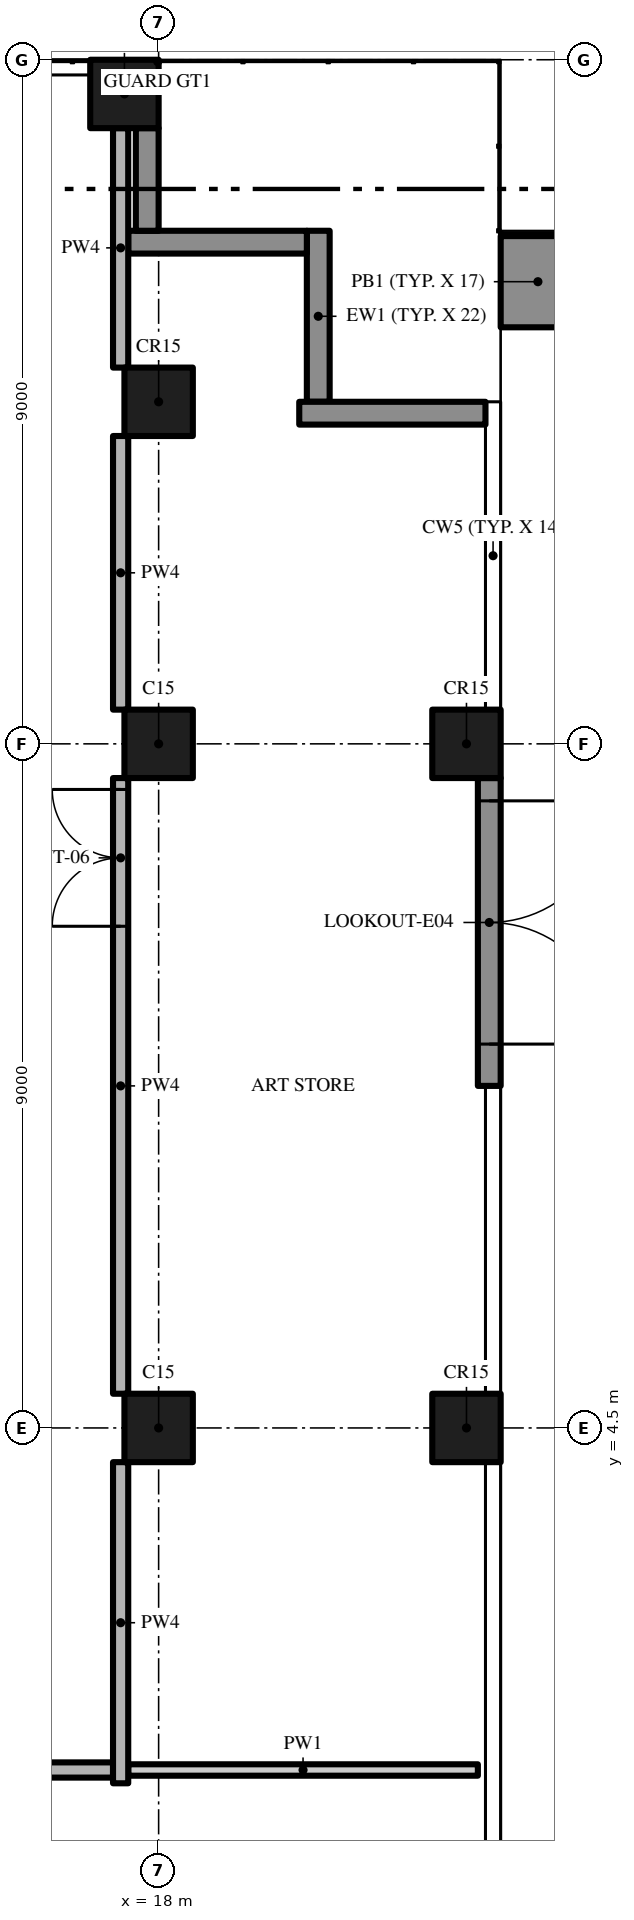
"""IFC4 building model, lengths in metres.
Left out: names, types, materials, properties, quantities, classifications, styles, units other than length and angle.
Written with IfcOpenShell. Run it as: python <this file> out.ifc"""

import sys

from ifc_helpers import new_model, si_unit, direction, frame, frame_2d, origin, origin_2d, place, context, subcontext, project, spatial, rectangle, extrude, element, fill, save


model = new_model("IFC4")
c1 = context("Model", 3, precision=1e-05, world=origin(), true_north=direction((0.0, 1.0)))
c2 = subcontext(c1, "Body", "Model", "MODEL_VIEW")
j1 = project(units=[si_unit("LENGTHUNIT", "METRE"), si_unit("PLANEANGLEUNIT", "RADIAN")], contexts=[c1])
p1 = place(None, origin())
s1 = spatial("IfcSite", under=j1, at=p1, CompositionType="ELEMENT")
p2 = place(p1, origin())
s2 = spatial("IfcBuilding", under=s1, at=p2, CompositionType="ELEMENT")
p3 = place(p2, frame((0.0, 0.0, 297.4)))
s3 = spatial("IfcBuildingStorey", under=s2, at=p3, CompositionType="ELEMENT", Elevation=297.4)
for number, where, z_axis, x_axis in (
    (1, (18.0, 13.5, 0.0), (0.0, 0.0, 1.0), (1.0, 0.0, 0.0)),
    (2, (17.55, 22.05, 0.0), (0.0, 0.0, 1.0), (1.0, 0.0, 0.0)),
    (3, (18.0, 4.5, 0.0), (0.0, 0.0, 1.0), (1.0, 0.0, 0.0)),
    (4, (22.05, 13.5, 0.0), (0.0, 0.0, 1.0), (1.0, 0.0, 0.0)),
    (5, (18.0, 18.0, 0.0), (0.0, 0.0, 1.0), (1.0, 0.0, 0.0)),
    (6, (22.05, 4.5, 0.0), (0.0, 0.0, 1.0), (1.0, 0.0, 0.0)),
):
    element("IfcColumn", number, at=place(p3, frame(where, z_axis=z_axis, x_axis=x_axis)), inside=s3, PredefinedType="COLUMN", context=c2, shape_type="SweptSolid", body=[
        extrude(rectangle(XDim=0.9, YDim=0.9, at=origin_2d()), origin(), (0.0, 0.0, 1.0), 5.65),
    ])
p4 = place(p3, frame((22.35, 13.05, 0.0), z_axis=(0.0, 0.0, 1.0), x_axis=(0.0, -1.0, 0.0)))
e7 = element("IfcWall", 7, at=p4, inside=s3, PredefinedType="SOLIDWALL", context=c2, shape_type="SweptSolid", body=[
    extrude(rectangle(XDim=4.05, YDim=0.3, at=frame_2d((2.025, 0.0))), origin(), (0.0, 0.0, 1.0), 5.65),
])
p5 = place(p4, frame((0.3, 0.0, 0.0)))
e8 = element("IfcOpeningElement", 8, at=p5, cuts=e7, PredefinedType="OPENING", context=c2, shape_type="SweptSolid", body=[
    extrude(rectangle(XDim=3.2, YDim=2.4, at=frame_2d((1.6, 1.2))), frame((0.0, 0.16, 0.0), z_axis=(0.0, -1.0, 0.0), x_axis=(1.0, 0.0, 0.0)), (0.0, 0.0, 1.0), 0.32),
])
p6 = place(p3, frame((19.85, 17.85, 0.0), z_axis=(0.0, 0.0, 1.0), x_axis=(1.0, 0.0, 0.0)))
e9 = element("IfcWall", 9, at=p6, inside=s3, PredefinedType="SOLIDWALL", context=c2, shape_type="SweptSolid", body=[
    extrude(rectangle(XDim=2.45, YDim=0.3, at=frame_2d((1.225, 0.0))), origin(), (0.0, 0.0, 1.0), 5.65),
])
p7 = place(p3, frame((20.1, 20.25, 0.0), z_axis=(0.0, 0.0, 1.0), x_axis=(0.0, -1.0, 0.0)))
e10 = element("IfcWall", 10, at=p7, inside=s3, PredefinedType="SOLIDWALL", context=c2, shape_type="SweptSolid", body=[
    extrude(rectangle(XDim=2.25, YDim=0.3, at=frame_2d((1.125, 0.0))), origin(), (0.0, 0.0, 1.0), 5.65),
])
p8 = place(p3, frame((17.6, 20.1, 0.0), z_axis=(0.0, 0.0, 1.0), x_axis=(1.0, 0.0, 0.0)))
e11 = element("IfcWall", 11, at=p8, inside=s3, PredefinedType="SOLIDWALL", context=c2, shape_type="SweptSolid", body=[
    extrude(rectangle(XDim=2.35, YDim=0.3, at=frame_2d((1.175, 0.0))), origin(), (0.0, 0.0, 1.0), 5.65),
])
p9 = place(p3, frame((17.85, 21.6, 0.0), z_axis=(0.0, 0.0, 1.0), x_axis=(0.0, -1.0, 0.0)))
e12 = element("IfcWall", 12, at=p9, inside=s3, PredefinedType="SOLIDWALL", context=c2, shape_type="SweptSolid", body=[
    extrude(rectangle(XDim=1.35, YDim=0.3, at=frame_2d((0.675, 0.0))), origin(), (0.0, 0.0, 1.0), 5.65),
])
p10 = place(p3, frame((23.48, 19.58, 0.0), z_axis=(0.0, 0.0, 1.0), x_axis=(-1.0, 0.0, 0.0)))
e13 = element("IfcWall", 13, at=p10, inside=s3, PredefinedType="USERDEFINED", context=c2, shape_type="SweptSolid", body=[
    extrude(rectangle(XDim=0.98, YDim=1.2, at=frame_2d((0.49, 0.0))), origin(), (0.0, 0.0, 1.0), 0.9),
])
p11 = place(p3, frame((-17.4, 0.0, 0.0), z_axis=(0.0, 0.0, 1.0), x_axis=(1.0, 0.0, 0.0)))
e14 = element("IfcWall", 14, at=p11, inside=s3, PredefinedType="PARTITIONING", context=c2, shape_type="SweptSolid", body=[
    extrude(rectangle(XDim=34.8, YDim=0.2, at=frame_2d((17.4, 0.0))), origin(), (0.0, 0.0, 1.0), 5.65),
])
p12 = place(p11, frame((0.9, 0.0, 0.0)))
e15 = element("IfcOpeningElement", 15, at=p12, cuts=e14, PredefinedType="OPENING", context=c2, shape_type="SweptSolid", body=[
    extrude(rectangle(XDim=2.0, YDim=2.4, at=frame_2d((1.0, 1.2))), frame((0.0, 0.11, 0.0), z_axis=(0.0, -1.0, 0.0), x_axis=(1.0, 0.0, 0.0)), (0.0, 0.0, 1.0), 0.22),
])
p13 = place(p11, frame((7.4, 0.0, 0.0)))
e16 = element("IfcOpeningElement", 16, at=p13, cuts=e14, PredefinedType="OPENING", context=c2, shape_type="SweptSolid", body=[
    extrude(rectangle(XDim=2.0, YDim=2.4, at=frame_2d((1.0, 1.2))), frame((0.0, 0.11, 0.0), z_axis=(0.0, -1.0, 0.0), x_axis=(1.0, 0.0, 0.0)), (0.0, 0.0, 1.0), 0.22),
])
p14 = place(p11, frame((18.65, 0.0, 0.0)))
e17 = element("IfcOpeningElement", 17, at=p14, cuts=e14, PredefinedType="OPENING", context=c2, shape_type="SweptSolid", body=[
    extrude(rectangle(XDim=2.0, YDim=2.4, at=frame_2d((1.0, 1.2))), frame((0.0, 0.11, 0.0), z_axis=(0.0, -1.0, 0.0), x_axis=(1.0, 0.0, 0.0)), (0.0, 0.0, 1.0), 0.22),
])
p15 = place(p11, frame((29.65, 0.0, 0.0)))
e18 = element("IfcOpeningElement", 18, at=p15, cuts=e14, PredefinedType="OPENING", context=c2, shape_type="SweptSolid", body=[
    extrude(rectangle(XDim=2.0, YDim=2.4, at=frame_2d((1.0, 1.2))), frame((0.0, 0.11, 0.0), z_axis=(0.0, -1.0, 0.0), x_axis=(1.0, 0.0, 0.0)), (0.0, 0.0, 1.0), 0.22),
])
p16 = place(p3, frame((17.6, 0.0, 0.0), z_axis=(0.0, 0.0, 1.0), x_axis=(1.0, 0.0, 0.0)))
e19 = element("IfcWall", 19, at=p16, inside=s3, PredefinedType="PARTITIONING", context=c2, shape_type="SweptSolid", body=[
    extrude(rectangle(XDim=4.6, YDim=0.15, at=frame_2d((2.3, 0.0))), origin(), (0.0, 0.0, 1.0), 5.65),
])
p17 = place(p3, frame((17.5, -0.175, 0.0), z_axis=(0.0, 0.0, 1.0), x_axis=(0.0, 1.0, 0.0)))
e20 = element("IfcWall", 20, at=p17, inside=s3, PredefinedType="PARTITIONING", context=c2, shape_type="SweptSolid", body=[
    extrude(rectangle(XDim=4.225, YDim=0.2, at=frame_2d((2.112, 0.0))), origin(), (0.0, 0.0, 1.0), 5.65),
])
p18 = place(p3, frame((17.5, 4.95, 0.0), z_axis=(0.0, 0.0, 1.0), x_axis=(0.0, 1.0, 0.0)))
e21 = element("IfcWall", 21, at=p18, inside=s3, PredefinedType="PARTITIONING", context=c2, shape_type="SweptSolid", body=[
    extrude(rectangle(XDim=8.1, YDim=0.2, at=frame_2d((4.05, 0.0))), origin(), (0.0, 0.0, 1.0), 5.65),
])
p19 = place(p18, frame((6.15, 0.0, 0.0)))
e22 = element("IfcOpeningElement", 22, at=p19, cuts=e21, PredefinedType="OPENING", context=c2, shape_type="SweptSolid", body=[
    extrude(rectangle(XDim=1.8, YDim=2.4, at=frame_2d((0.9, 1.2))), frame((0.0, 0.11, 0.0), z_axis=(0.0, -1.0, 0.0), x_axis=(1.0, 0.0, 0.0)), (0.0, 0.0, 1.0), 0.22),
])
p20 = place(p3, frame((17.5, 13.95, 0.0), z_axis=(0.0, 0.0, 1.0), x_axis=(0.0, 1.0, 0.0)))
e23 = element("IfcWall", 23, at=p20, inside=s3, PredefinedType="PARTITIONING", context=c2, shape_type="SweptSolid", body=[
    extrude(rectangle(XDim=3.6, YDim=0.2, at=frame_2d((1.8, 0.0))), origin(), (0.0, 0.0, 1.0), 5.65),
])
p21 = place(p3, frame((17.5, 18.45, 0.0), z_axis=(0.0, 0.0, 1.0), x_axis=(0.0, 1.0, 0.0)))
e24 = element("IfcWall", 24, at=p21, inside=s3, PredefinedType="PARTITIONING", context=c2, shape_type="SweptSolid", body=[
    extrude(rectangle(XDim=3.15, YDim=0.2, at=frame_2d((1.575, 0.0))), origin(), (0.0, 0.0, 1.0), 5.65),
])
p22 = place(p5, origin())
e25 = element("IfcDoor", 25, at=p22, inside=s3, OperationType="SINGLE_SWING_LEFT", PredefinedType="DOOR", context=c2, shape_type="SweptSolid", body=[
    extrude(rectangle(XDim=3.2, YDim=2.4, at=frame_2d((1.6, 1.2))), frame((0.0, 0.025, 0.0), z_axis=(0.0, -1.0, 0.0), x_axis=(1.0, 0.0, 0.0)), (0.0, 0.0, 1.0), 0.05),
])
fill(e8, e25)
p23 = place(p19, origin())
e26 = element("IfcDoor", 26, at=p23, inside=s3, OperationType="DOUBLE_DOOR_SINGLE_SWING", PredefinedType="DOOR", context=c2, shape_type="SweptSolid", body=[
    extrude(rectangle(XDim=1.8, YDim=2.4, at=frame_2d((0.9, 1.2))), frame((0.0, 0.025, 0.0), z_axis=(0.0, -1.0, 0.0), x_axis=(1.0, 0.0, 0.0)), (0.0, 0.0, 1.0), 0.05),
])
fill(e22, e26)
save(model, sys.argv[1])
